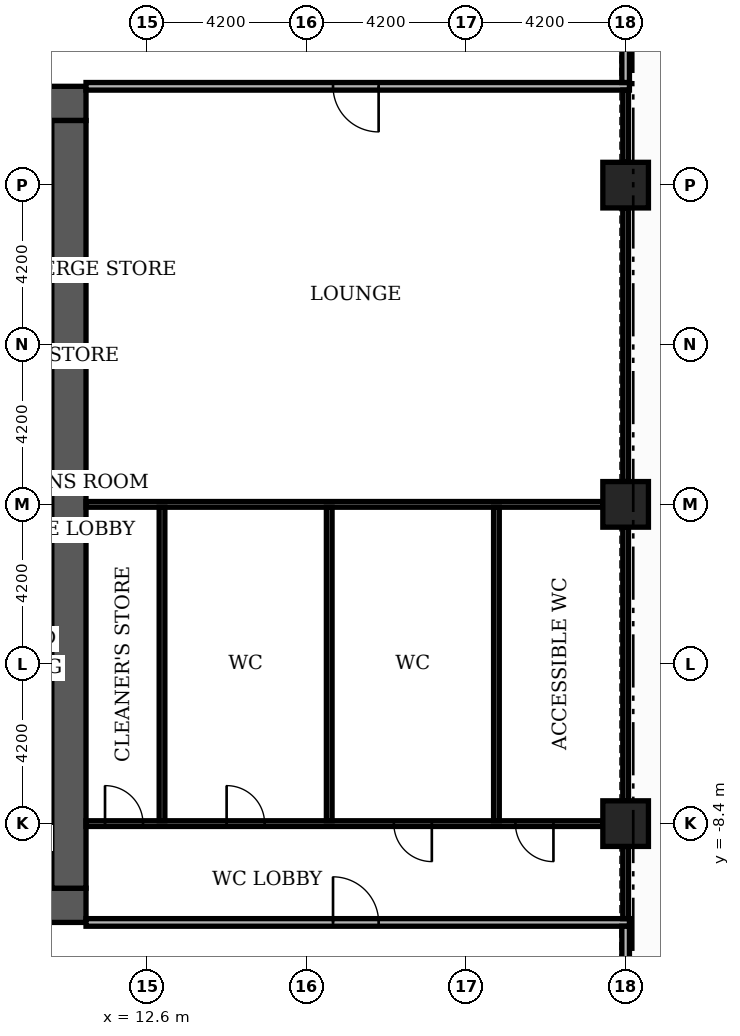
"""IFC4 building model, lengths in metres.
Left out: names, types, materials, properties, quantities, classifications, styles, units other than length and angle.
Written with IfcOpenShell. Run it as: python <this file> out.ifc"""

import sys

from ifc_helpers import new_model, si_unit, direction, frame, frame_2d, origin, origin_2d, place, context, subcontext, project, spatial, rectangle, extrude, element, fill, save


model = new_model("IFC4")
c1 = context("Model", 3, precision=1e-05, world=origin(), true_north=direction((0.0, 1.0)))
c2 = subcontext(c1, "Body", "Model", "MODEL_VIEW")
j1 = project(units=[si_unit("LENGTHUNIT", "METRE"), si_unit("PLANEANGLEUNIT", "RADIAN")], contexts=[c1])
p1 = place(None, origin())
s1 = spatial("IfcSite", under=j1, at=p1, CompositionType="ELEMENT")
p2 = place(p1, origin())
s2 = spatial("IfcBuilding", under=s1, at=p2, CompositionType="ELEMENT")
p3 = place(p2, frame((0.0, 0.0, 22.2)))
s3 = spatial("IfcBuildingStorey", under=s2, at=p3, CompositionType="ELEMENT", Elevation=22.2)
for number, where, z_axis, x_axis in (
    (1, (9.2, -3.0, 0.0), (0.0, 0.0, 1.0), (1.0, 0.0, 0.0)),
    (2, (9.2, 2.4, 0.0), (0.0, 0.0, 1.0), (1.0, 0.0, 0.0)),
):
    element("IfcWall", number, at=place(p3, frame(where, z_axis=z_axis, x_axis=x_axis)), inside=s3, PredefinedType="SHEAR", context=c2, shape_type="SweptSolid", body=[
        extrude(rectangle(XDim=0.9, YDim=0.2, at=frame_2d((0.45, 0.0))), origin(), (0.0, 0.0, 1.0), 4.3),
    ])
p4 = place(p3, frame((-11.0, -10.55, 0.0), z_axis=(0.0, 0.0, 1.0), x_axis=(1.0, 0.0, 0.0)))
e3 = element("IfcWall", 3, at=p4, inside=s3, PredefinedType="SHEAR", context=c2, shape_type="SweptSolid", body=[
    extrude(rectangle(XDim=22.0, YDim=0.9, at=frame_2d((11.0, 0.0))), origin(), (0.0, 0.0, 1.0), 4.3),
])
p5 = place(p4, frame((7.4, 0.0, 0.0)))
e4 = element("IfcOpeningElement", 4, at=p5, cuts=e3, PredefinedType="OPENING", context=c2, shape_type="SweptSolid", body=[
    extrude(rectangle(XDim=1.8, YDim=2.2, at=frame_2d((0.9, 1.1))), frame((0.0, 0.46, 0.0), z_axis=(0.0, -1.0, 0.0), x_axis=(1.0, 0.0, 0.0)), (0.0, 0.0, 1.0), 0.92),
])
p6 = place(p3, frame((-11.0, 10.55, 0.0), z_axis=(0.0, 0.0, 1.0), x_axis=(1.0, 0.0, 0.0)))
e5 = element("IfcWall", 5, at=p6, inside=s3, PredefinedType="SHEAR", context=c2, shape_type="SweptSolid", body=[
    extrude(rectangle(XDim=22.0, YDim=0.9, at=frame_2d((11.0, 0.0))), origin(), (0.0, 0.0, 1.0), 4.3),
])
p7 = place(p6, frame((13.3, 0.0, 0.0)))
e6 = element("IfcOpeningElement", 6, at=p7, cuts=e5, PredefinedType="OPENING", context=c2, shape_type="SweptSolid", body=[
    extrude(rectangle(XDim=1.8, YDim=2.2, at=frame_2d((0.9, 1.1))), frame((0.0, 0.46, 0.0), z_axis=(0.0, -1.0, 0.0), x_axis=(1.0, 0.0, 0.0)), (0.0, 0.0, 1.0), 0.92),
])
p8 = place(p3, frame((10.55, -10.1, 0.0), z_axis=(0.0, 0.0, 1.0), x_axis=(0.0, 1.0, 0.0)))
e7 = element("IfcWall", 7, at=p8, inside=s3, PredefinedType="SHEAR", context=c2, shape_type="SweptSolid", body=[
    extrude(rectangle(XDim=20.2, YDim=0.9, at=frame_2d((10.1, 0.0))), origin(), (0.0, 0.0, 1.0), 4.3),
])
for number, where, z_axis, x_axis in (
    (8, (25.2, 0.0, 0.0), (0.0, 0.0, 1.0), (1.0, 0.0, 0.0)),
    (9, (25.2, 8.4, 0.0), (0.0, 0.0, 1.0), (1.0, 0.0, 0.0)),
    (10, (25.2, -8.4, 0.0), (0.0, 0.0, 1.0), (1.0, 0.0, 0.0)),
):
    element("IfcColumn", number, at=place(p3, frame(where, z_axis=z_axis, x_axis=x_axis)), inside=s3, PredefinedType="COLUMN", context=c2, shape_type="SweptSolid", body=[
        extrude(rectangle(XDim=1.2, YDim=1.2, at=origin_2d()), origin(), (0.0, 0.0, 1.0), 4.8),
    ])
p9 = place(p3, frame((11.0, -11.0, 0.0), z_axis=(0.0, 0.0, 1.0), x_axis=(1.0, 0.0, 0.0)))
e11 = element("IfcWall", 11, at=p9, inside=s3, PredefinedType="PARTITIONING", context=c2, shape_type="SweptSolid", body=[
    extrude(rectangle(XDim=14.3, YDim=0.2, at=frame_2d((7.15, 0.0))), origin(), (0.0, 0.0, 1.0), 4.3),
])
p10 = place(p9, frame((6.5, 0.0, 0.0)))
e12 = element("IfcOpeningElement", 12, at=p10, cuts=e11, PredefinedType="OPENING", context=c2, shape_type="SweptSolid", body=[
    extrude(rectangle(XDim=1.2, YDim=2.2, at=frame_2d((0.6, 1.1))), frame((0.0, 0.11, 0.0), z_axis=(0.0, -1.0, 0.0), x_axis=(1.0, 0.0, 0.0)), (0.0, 0.0, 1.0), 0.22),
])
p11 = place(p3, frame((11.0, -8.4, 0.0), z_axis=(0.0, 0.0, 1.0), x_axis=(1.0, 0.0, 0.0)))
e13 = element("IfcWall", 13, at=p11, inside=s3, PredefinedType="PARTITIONING", context=c2, shape_type="SweptSolid", body=[
    extrude(rectangle(XDim=13.6, YDim=0.15, at=frame_2d((6.8, 0.0))), origin(), (0.0, 0.0, 1.0), 4.3),
])
p12 = place(p11, frame((0.5, 0.0, 0.0)))
e14 = element("IfcOpeningElement", 14, at=p12, cuts=e13, PredefinedType="OPENING", context=c2, shape_type="SweptSolid", body=[
    extrude(rectangle(XDim=1.0, YDim=2.1, at=frame_2d((0.5, 1.05))), frame((0.0, 0.085, 0.0), z_axis=(0.0, -1.0, 0.0), x_axis=(1.0, 0.0, 0.0)), (0.0, 0.0, 1.0), 0.17),
])
p13 = place(p11, frame((3.7, 0.0, 0.0)))
e15 = element("IfcOpeningElement", 15, at=p13, cuts=e13, PredefinedType="OPENING", context=c2, shape_type="SweptSolid", body=[
    extrude(rectangle(XDim=1.0, YDim=2.1, at=frame_2d((0.5, 1.05))), frame((0.0, 0.085, 0.0), z_axis=(0.0, -1.0, 0.0), x_axis=(1.0, 0.0, 0.0)), (0.0, 0.0, 1.0), 0.17),
])
p14 = place(p11, frame((8.1, 0.0, 0.0)))
e16 = element("IfcOpeningElement", 16, at=p14, cuts=e13, PredefinedType="OPENING", context=c2, shape_type="SweptSolid", body=[
    extrude(rectangle(XDim=1.0, YDim=2.1, at=frame_2d((0.5, 1.05))), frame((0.0, 0.085, 0.0), z_axis=(0.0, -1.0, 0.0), x_axis=(1.0, 0.0, 0.0)), (0.0, 0.0, 1.0), 0.17),
])
p15 = place(p11, frame((11.3, 0.0, 0.0)))
e17 = element("IfcOpeningElement", 17, at=p15, cuts=e13, PredefinedType="OPENING", context=c2, shape_type="SweptSolid", body=[
    extrude(rectangle(XDim=1.0, YDim=2.1, at=frame_2d((0.5, 1.05))), frame((0.0, 0.085, 0.0), z_axis=(0.0, -1.0, 0.0), x_axis=(1.0, 0.0, 0.0)), (0.0, 0.0, 1.0), 0.17),
])
p16 = place(p3, frame((11.0, 0.0, 0.0), z_axis=(0.0, 0.0, 1.0), x_axis=(1.0, 0.0, 0.0)))
e18 = element("IfcWall", 18, at=p16, inside=s3, PredefinedType="PARTITIONING", context=c2, shape_type="SweptSolid", body=[
    extrude(rectangle(XDim=13.6, YDim=0.15, at=frame_2d((6.8, 0.0))), origin(), (0.0, 0.0, 1.0), 4.3),
])
p17 = place(p3, frame((11.0, 11.0, 0.0), z_axis=(0.0, 0.0, 1.0), x_axis=(1.0, 0.0, 0.0)))
e19 = element("IfcWall", 19, at=p17, inside=s3, PredefinedType="PARTITIONING", context=c2, shape_type="SweptSolid", body=[
    extrude(rectangle(XDim=14.3, YDim=0.2, at=frame_2d((7.15, 0.0))), origin(), (0.0, 0.0, 1.0), 4.3),
])
p18 = place(p17, frame((6.5, 0.0, 0.0)))
e20 = element("IfcOpeningElement", 20, at=p18, cuts=e19, PredefinedType="OPENING", context=c2, shape_type="SweptSolid", body=[
    extrude(rectangle(XDim=1.2, YDim=2.2, at=frame_2d((0.6, 1.1))), frame((0.0, 0.11, 0.0), z_axis=(0.0, -1.0, 0.0), x_axis=(1.0, 0.0, 0.0)), (0.0, 0.0, 1.0), 0.22),
])
for number, where, z_axis, x_axis in (
    (21, (13.0, -8.325, 0.0), (0.0, 0.0, 1.0), (0.0, 1.0, 0.0)),
    (22, (17.4, -8.325, 0.0), (0.0, 0.0, 1.0), (0.0, 1.0, 0.0)),
    (23, (21.8, -8.325, 0.0), (0.0, 0.0, 1.0), (0.0, 1.0, 0.0)),
):
    element("IfcWall", number, at=place(p3, frame(where, z_axis=z_axis, x_axis=x_axis)), inside=s3, PredefinedType="PARTITIONING", context=c2, shape_type="SweptSolid", body=[
        extrude(rectangle(XDim=8.25, YDim=0.15, at=frame_2d((4.125, 0.0))), origin(), (0.0, 0.0, 1.0), 4.3),
    ])
p19 = place(p3, frame((25.2, -16.2, 0.0), z_axis=(0.0, 0.0, 1.0), x_axis=(0.0, 1.0, 0.0)))
e24 = element("IfcWall", 24, at=p19, inside=s3, PredefinedType="PARTITIONING", context=c2, shape_type="SweptSolid", body=[
    extrude(rectangle(XDim=5.1, YDim=0.2, at=frame_2d((2.55, 0.0))), origin(), (0.0, 0.0, 1.0), 4.3),
])
p20 = place(p19, frame((1.5, 0.0, 0.0)))
e25 = element("IfcOpeningElement", 25, at=p20, cuts=e24, PredefinedType="OPENING", context=c2, shape_type="SweptSolid", body=[
    extrude(rectangle(XDim=1.8, YDim=2.2, at=frame_2d((0.9, 1.1))), frame((0.0, 0.11, 0.0), z_axis=(0.0, -1.0, 0.0), x_axis=(1.0, 0.0, 0.0)), (0.0, 0.0, 1.0), 0.22),
])
p21 = place(p3, frame((25.2, -10.9, 0.0), z_axis=(0.0, 0.0, 1.0), x_axis=(0.0, 1.0, 0.0)))
e26 = element("IfcWall", 26, at=p21, inside=s3, PredefinedType="PARTITIONING", context=c2, shape_type="SweptSolid", body=[
    extrude(rectangle(XDim=1.9, YDim=0.15, at=frame_2d((0.95, 0.0))), origin(), (0.0, 0.0, 1.0), 4.3),
])
for number, where, z_axis, x_axis in (
    (27, (25.2, -7.8, 0.0), (0.0, 0.0, 1.0), (0.0, 1.0, 0.0)),
    (28, (25.2, 0.6, 0.0), (0.0, 0.0, 1.0), (0.0, 1.0, 0.0)),
):
    element("IfcWall", number, at=place(p3, frame(where, z_axis=z_axis, x_axis=x_axis)), inside=s3, PredefinedType="PARTITIONING", context=c2, shape_type="SweptSolid", body=[
        extrude(rectangle(XDim=7.2, YDim=0.15, at=frame_2d((3.6, 0.0))), origin(), (0.0, 0.0, 1.0), 4.3),
    ])
p22 = place(p3, frame((25.2, 9.0, 0.0), z_axis=(0.0, 0.0, 1.0), x_axis=(0.0, 1.0, 0.0)))
e29 = element("IfcWall", 29, at=p22, inside=s3, PredefinedType="PARTITIONING", context=c2, shape_type="SweptSolid", body=[
    extrude(rectangle(XDim=1.9, YDim=0.15, at=frame_2d((0.95, 0.0))), origin(), (0.0, 0.0, 1.0), 4.3),
])
p23 = place(p3, frame((25.2, 11.1, 0.0), z_axis=(0.0, 0.0, 1.0), x_axis=(0.0, 1.0, 0.0)))
e30 = element("IfcWall", 30, at=p23, inside=s3, PredefinedType="PARTITIONING", context=c2, shape_type="SweptSolid", body=[
    extrude(rectangle(XDim=5.1, YDim=0.2, at=frame_2d((2.55, 0.0))), origin(), (0.0, 0.0, 1.0), 4.3),
])
p24 = place(p23, frame((1.8, 0.0, 0.0)))
e31 = element("IfcOpeningElement", 31, at=p24, cuts=e30, PredefinedType="OPENING", context=c2, shape_type="SweptSolid", body=[
    extrude(rectangle(XDim=1.8, YDim=2.2, at=frame_2d((0.9, 1.1))), frame((0.0, 0.11, 0.0), z_axis=(0.0, -1.0, 0.0), x_axis=(1.0, 0.0, 0.0)), (0.0, 0.0, 1.0), 0.22),
])
p25 = place(p10, origin())
e32 = element("IfcDoor", 32, at=p25, inside=s3, OperationType="SINGLE_SWING_LEFT", PredefinedType="DOOR", context=c2, shape_type="SweptSolid", body=[
    extrude(rectangle(XDim=1.2, YDim=2.2, at=frame_2d((0.6, 1.1))), frame((0.0, 0.025, 0.0), z_axis=(0.0, -1.0, 0.0), x_axis=(1.0, 0.0, 0.0)), (0.0, 0.0, 1.0), 0.05),
])
fill(e12, e32)
p26 = place(p12, origin())
e33 = element("IfcDoor", 33, at=p26, inside=s3, OperationType="SINGLE_SWING_LEFT", PredefinedType="DOOR", context=c2, shape_type="SweptSolid", body=[
    extrude(rectangle(XDim=1.0, YDim=2.1, at=frame_2d((0.5, 1.05))), frame((0.0, 0.025, 0.0), z_axis=(0.0, -1.0, 0.0), x_axis=(1.0, 0.0, 0.0)), (0.0, 0.0, 1.0), 0.05),
])
fill(e14, e33)
p27 = place(p13, origin())
e34 = element("IfcDoor", 34, at=p27, inside=s3, OperationType="SINGLE_SWING_LEFT", PredefinedType="DOOR", context=c2, shape_type="SweptSolid", body=[
    extrude(rectangle(XDim=1.0, YDim=2.1, at=frame_2d((0.5, 1.05))), frame((0.0, 0.025, 0.0), z_axis=(0.0, -1.0, 0.0), x_axis=(1.0, 0.0, 0.0)), (0.0, 0.0, 1.0), 0.05),
])
fill(e15, e34)
p28 = place(p14, origin())
e35 = element("IfcDoor", 35, at=p28, inside=s3, OperationType="SINGLE_SWING_RIGHT", PredefinedType="DOOR", context=c2, shape_type="SweptSolid", body=[
    extrude(rectangle(XDim=1.0, YDim=2.1, at=frame_2d((0.5, 1.05))), frame((0.0, 0.025, 0.0), z_axis=(0.0, -1.0, 0.0), x_axis=(1.0, 0.0, 0.0)), (0.0, 0.0, 1.0), 0.05),
])
fill(e16, e35)
p29 = place(p15, origin())
e36 = element("IfcDoor", 36, at=p29, inside=s3, OperationType="SINGLE_SWING_RIGHT", PredefinedType="DOOR", context=c2, shape_type="SweptSolid", body=[
    extrude(rectangle(XDim=1.0, YDim=2.1, at=frame_2d((0.5, 1.05))), frame((0.0, 0.025, 0.0), z_axis=(0.0, -1.0, 0.0), x_axis=(1.0, 0.0, 0.0)), (0.0, 0.0, 1.0), 0.05),
])
fill(e17, e36)
p30 = place(p18, origin())
e37 = element("IfcDoor", 37, at=p30, inside=s3, OperationType="SINGLE_SWING_RIGHT", PredefinedType="DOOR", context=c2, shape_type="SweptSolid", body=[
    extrude(rectangle(XDim=1.2, YDim=2.2, at=frame_2d((0.6, 1.1))), frame((0.0, 0.025, 0.0), z_axis=(0.0, -1.0, 0.0), x_axis=(1.0, 0.0, 0.0)), (0.0, 0.0, 1.0), 0.05),
])
fill(e20, e37)
save(model, sys.argv[1])
